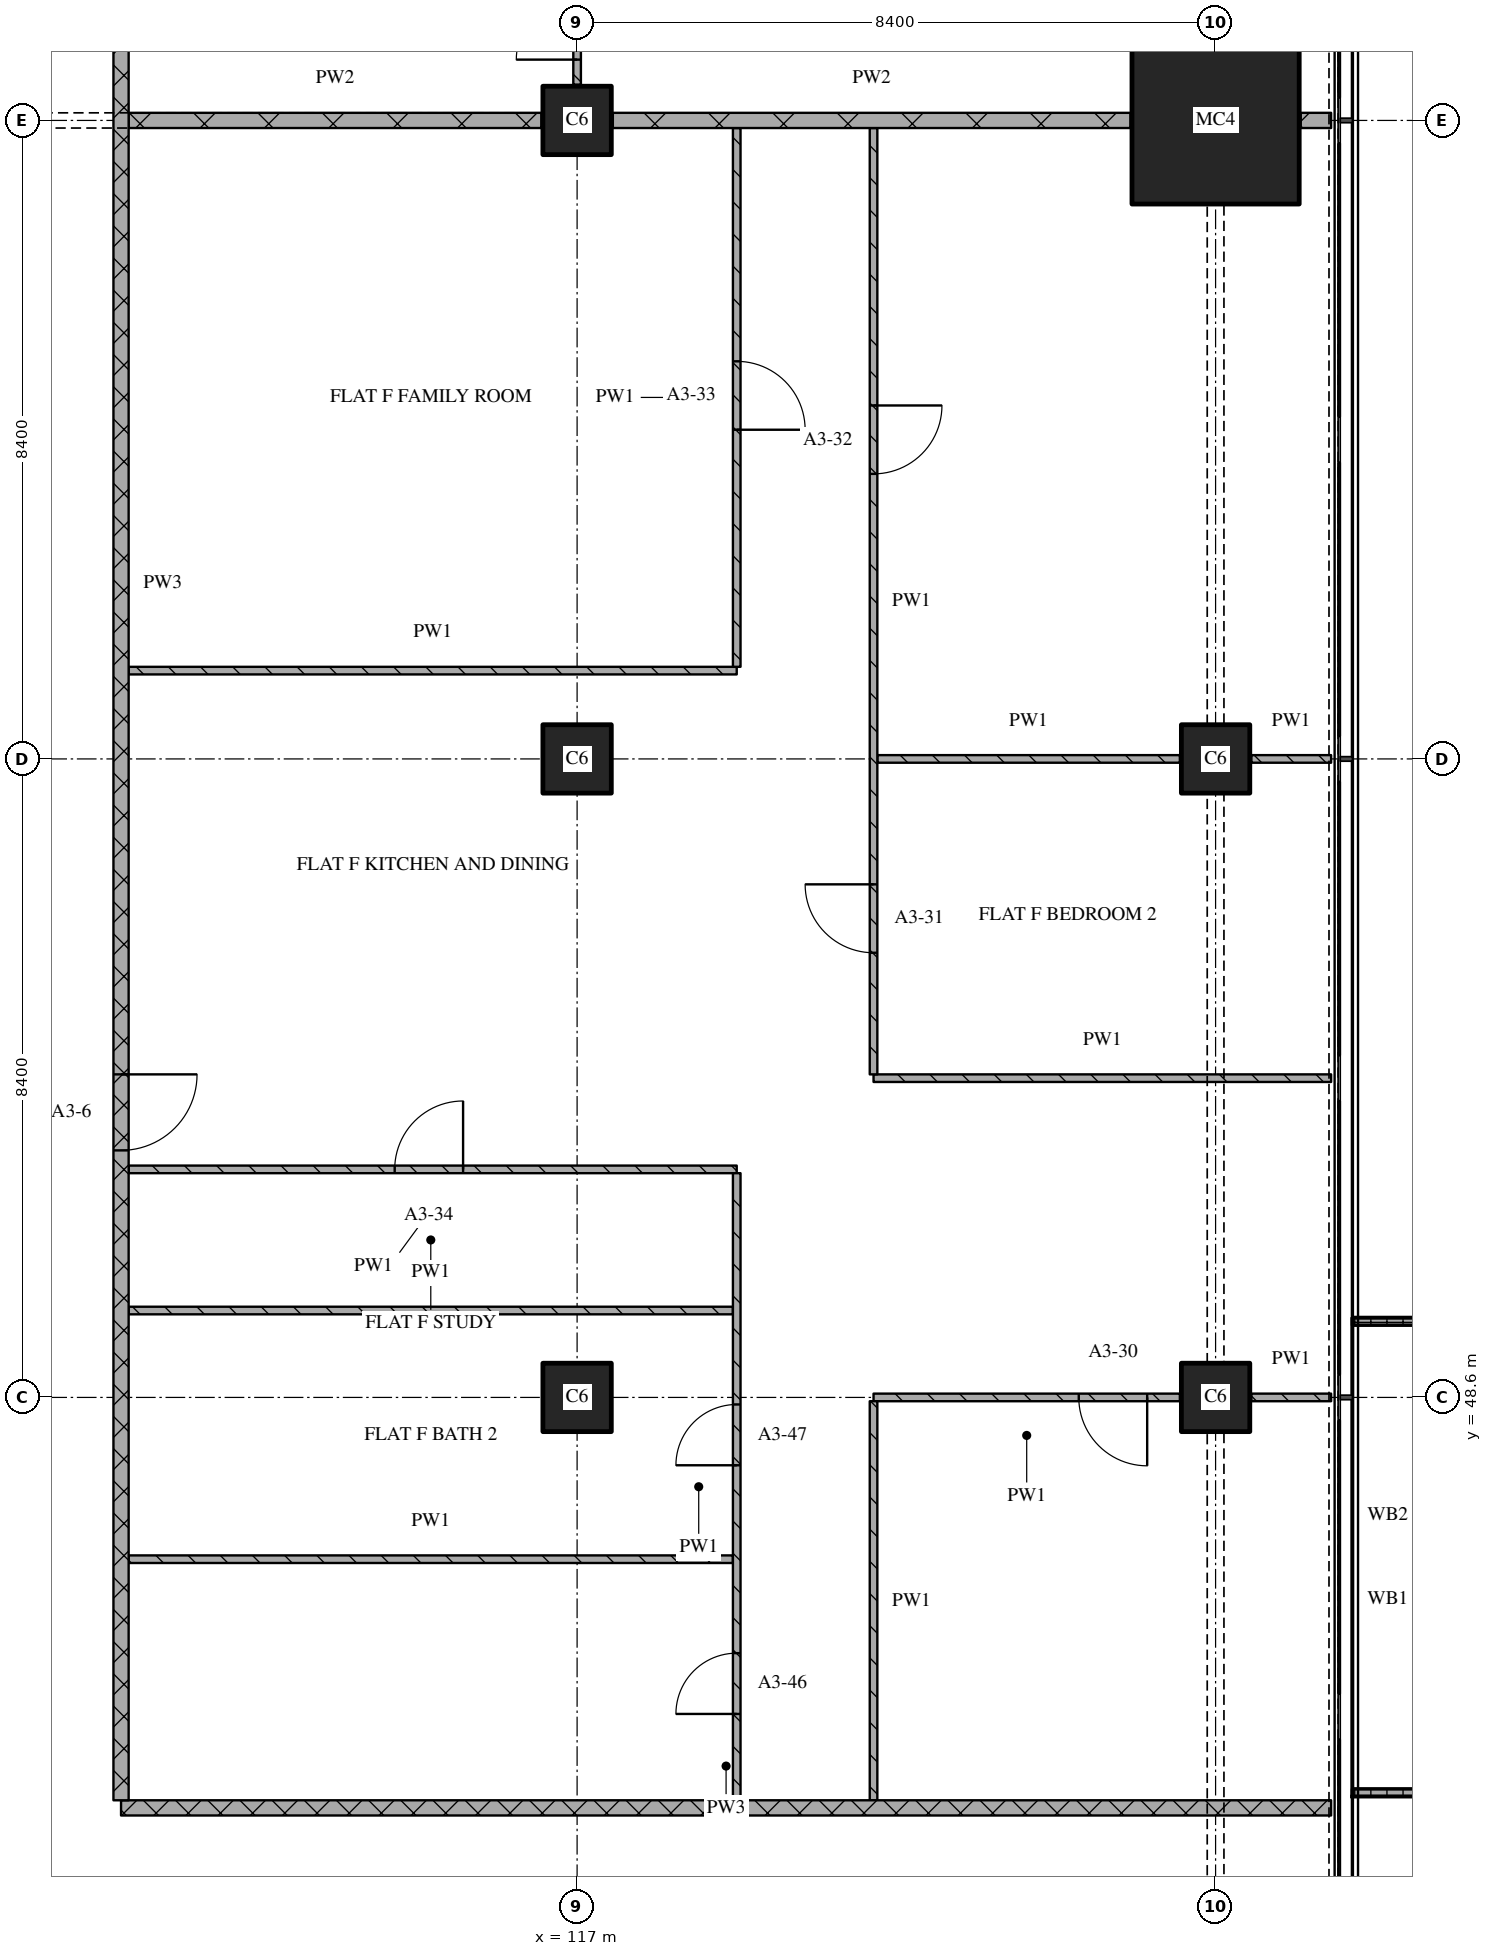
"""IFC4 building model, lengths in metres.
Left out: names, types, materials, properties, quantities, classifications, styles, units other than length and angle.
Written with IfcOpenShell. Run it as: python <this file> out.ifc"""

import sys

from ifc_helpers import new_model, si_unit, direction, frame, frame_2d, origin, origin_2d, place, context, subcontext, project, spatial, polyline, rectangle, outline, extrude, element, fill, save


model = new_model("IFC4")
c1 = context("Model", 3, precision=1e-05, world=origin(), true_north=direction((0.0, 1.0)))
c2 = subcontext(c1, "Body", "Model", "MODEL_VIEW")
j1 = project(units=[si_unit("LENGTHUNIT", "METRE"), si_unit("PLANEANGLEUNIT", "RADIAN")], contexts=[c1])
p1 = place(None, origin())
s1 = spatial("IfcSite", under=j1, at=p1, CompositionType="ELEMENT")
p2 = place(p1, origin())
s2 = spatial("IfcBuilding", under=s1, at=p2, CompositionType="ELEMENT")
p3 = place(p2, frame((0.0, 0.0, 58.8)))
s3 = spatial("IfcBuildingStorey", under=s2, at=p3, CompositionType="ELEMENT", Elevation=58.8)
for number, where, z_axis, x_axis in (
    (1, (117.0, 48.6, 0.0), (0.0, 0.0, 1.0), (1.0, 0.0, 0.0)),
    (2, (117.0, 57.0, 0.0), (0.0, 0.0, 1.0), (1.0, 0.0, 0.0)),
    (3, (117.0, 65.4, 0.0), (0.0, 0.0, 1.0), (1.0, 0.0, 0.0)),
    (4, (125.4, 48.6, 0.0), (0.0, 0.0, 1.0), (1.0, 0.0, 0.0)),
    (5, (125.4, 57.0, 0.0), (0.0, 0.0, 1.0), (1.0, 0.0, 0.0)),
):
    element("IfcColumn", number, at=place(p3, frame(where, z_axis=z_axis, x_axis=x_axis)), inside=s3, PredefinedType="COLUMN", context=c2, shape_type="SweptSolid", body=[
        extrude(rectangle(XDim=0.9, YDim=0.9, at=origin_2d()), origin(), (0.0, 0.0, 1.0), 3.6),
    ])
p4 = place(p3, frame((125.4, 65.4, 0.0), z_axis=(0.0, 0.0, 1.0), x_axis=(1.0, 0.0, 0.0)))
e6 = element("IfcColumn", 6, at=p4, inside=s3, PredefinedType="COLUMN", context=c2, shape_type="SweptSolid", body=[
    extrude(rectangle(XDim=2.2, YDim=2.2, at=origin_2d()), origin(), (0.0, 0.0, 1.0), 3.6),
])
p5 = place(p3, origin())
e7 = element("IfcWall", 7, at=p5, inside=s3, PredefinedType="SOLIDWALL", context=c2, shape_type="SweptSolid", body=[
    extrude(outline(polyline([(127.2, 43.35), (127.2, 43.45), (128.967, 43.45), (128.967, 49.55), (127.2, 49.55), (127.2, 49.65), (129.067, 49.65), (129.067, 43.35), (127.2, 43.35)])), origin(), (0.0, 0.0, 1.0), 1.0),
])
p6 = place(p3, frame((111.0, 43.2, 0.0), z_axis=(0.0, 0.0, 1.0), x_axis=(1.0, 0.0, 0.0)))
e8 = element("IfcWall", 8, at=p6, inside=s3, PredefinedType="PARTITIONING", context=c2, shape_type="SweptSolid", body=[
    extrude(rectangle(XDim=15.92, YDim=0.2, at=frame_2d((7.96, 0.0))), origin(), (0.0, 0.0, 1.0), 3.32),
])
p7 = place(p3, frame((111.1, 46.472, 0.0), z_axis=(0.0, 0.0, 1.0), x_axis=(1.0, 0.0, 0.0)))
e9 = element("IfcWall", 9, at=p7, inside=s3, PredefinedType="PARTITIONING", context=c2, shape_type="SweptSolid", body=[
    extrude(rectangle(XDim=7.95, YDim=0.1, at=frame_2d((3.975, 0.0))), origin(), (0.0, 0.0, 1.0), 3.32),
])
p8 = place(p3, frame((124.93, 48.6, 0.0), z_axis=(0.0, 0.0, 1.0), x_axis=(-1.0, 0.0, 0.0)))
e10 = element("IfcWall", 10, at=p8, inside=s3, PredefinedType="PARTITIONING", context=c2, shape_type="SweptSolid", body=[
    extrude(rectangle(XDim=4.03, YDim=0.1, at=frame_2d((2.015, 0.0))), origin(), (0.0, 0.0, 1.0), 3.32),
])
p9 = place(p8, frame((0.43, 0.0, 0.0)))
e11 = element("IfcOpeningElement", 11, at=p9, cuts=e10, PredefinedType="OPENING", context=c2, shape_type="SweptSolid", body=[
    extrude(rectangle(XDim=0.9, YDim=2.1, at=frame_2d((0.45, 1.05))), frame((0.0, 0.06, 0.0), z_axis=(0.0, -1.0, 0.0), x_axis=(1.0, 0.0, 0.0)), (0.0, 0.0, 1.0), 0.12),
])
p10 = place(p3, frame((125.87, 48.6, 0.0), z_axis=(0.0, 0.0, 1.0), x_axis=(1.0, 0.0, 0.0)))
e12 = element("IfcWall", 12, at=p10, inside=s3, PredefinedType="PARTITIONING", context=c2, shape_type="SweptSolid", body=[
    extrude(rectangle(XDim=1.05, YDim=0.1, at=frame_2d((0.525, 0.0))), origin(), (0.0, 0.0, 1.0), 3.32),
])
p11 = place(p3, frame((111.1, 49.743, 0.0), z_axis=(0.0, 0.0, 1.0), x_axis=(1.0, 0.0, 0.0)))
e13 = element("IfcWall", 13, at=p11, inside=s3, PredefinedType="PARTITIONING", context=c2, shape_type="SweptSolid", body=[
    extrude(rectangle(XDim=7.95, YDim=0.1, at=frame_2d((3.975, 0.0))), origin(), (0.0, 0.0, 1.0), 3.32),
])
p12 = place(p3, frame((119.1, 51.6, 0.0), z_axis=(0.0, 0.0, 1.0), x_axis=(-1.0, 0.0, 0.0)))
e14 = element("IfcWall", 14, at=p12, inside=s3, PredefinedType="PARTITIONING", context=c2, shape_type="SweptSolid", body=[
    extrude(rectangle(XDim=8.0, YDim=0.1, at=frame_2d((4.0, 0.0))), origin(), (0.0, 0.0, 1.0), 3.32),
])
p13 = place(p12, frame((3.6, 0.0, 0.0)))
e15 = element("IfcOpeningElement", 15, at=p13, cuts=e14, PredefinedType="OPENING", context=c2, shape_type="SweptSolid", body=[
    extrude(rectangle(XDim=0.9, YDim=2.1, at=frame_2d((0.45, 1.05))), frame((0.0, 0.06, 0.0), z_axis=(0.0, -1.0, 0.0), x_axis=(1.0, 0.0, 0.0)), (0.0, 0.0, 1.0), 0.12),
])
p14 = place(p3, frame((120.9, 52.8, 0.0), z_axis=(0.0, 0.0, 1.0), x_axis=(1.0, 0.0, 0.0)))
e16 = element("IfcWall", 16, at=p14, inside=s3, PredefinedType="PARTITIONING", context=c2, shape_type="SweptSolid", body=[
    extrude(rectangle(XDim=6.02, YDim=0.1, at=frame_2d((3.01, 0.0))), origin(), (0.0, 0.0, 1.0), 3.32),
])
p15 = place(p3, frame((120.95, 57.0, 0.0), z_axis=(0.0, 0.0, 1.0), x_axis=(1.0, 0.0, 0.0)))
e17 = element("IfcWall", 17, at=p15, inside=s3, PredefinedType="PARTITIONING", context=c2, shape_type="SweptSolid", body=[
    extrude(rectangle(XDim=3.98, YDim=0.1, at=frame_2d((1.99, 0.0))), origin(), (0.0, 0.0, 1.0), 3.32),
])
p16 = place(p3, frame((125.87, 57.0, 0.0), z_axis=(0.0, 0.0, 1.0), x_axis=(1.0, 0.0, 0.0)))
e18 = element("IfcWall", 18, at=p16, inside=s3, PredefinedType="PARTITIONING", context=c2, shape_type="SweptSolid", body=[
    extrude(rectangle(XDim=1.05, YDim=0.1, at=frame_2d((0.525, 0.0))), origin(), (0.0, 0.0, 1.0), 3.32),
])
p17 = place(p3, frame((111.1, 58.162, 0.0), z_axis=(0.0, 0.0, 1.0), x_axis=(1.0, 0.0, 0.0)))
e19 = element("IfcWall", 19, at=p17, inside=s3, PredefinedType="PARTITIONING", context=c2, shape_type="SweptSolid", body=[
    extrude(rectangle(XDim=8.0, YDim=0.1, at=frame_2d((4.0, 0.0))), origin(), (0.0, 0.0, 1.0), 3.32),
])
p18 = place(p3, frame((111.1, 65.4, 0.0), z_axis=(0.0, 0.0, 1.0), x_axis=(1.0, 0.0, 0.0)))
e20 = element("IfcWall", 20, at=p18, inside=s3, PredefinedType="PARTITIONING", context=c2, shape_type="SweptSolid", body=[
    extrude(rectangle(XDim=5.43, YDim=0.2, at=frame_2d((2.715, 0.0))), origin(), (0.0, 0.0, 1.0), 2.82),
])
p19 = place(p3, frame((117.47, 65.4, 0.0), z_axis=(0.0, 0.0, 1.0), x_axis=(1.0, 0.0, 0.0)))
e21 = element("IfcWall", 21, at=p19, inside=s3, PredefinedType="PARTITIONING", context=c2, shape_type="SweptSolid", body=[
    extrude(rectangle(XDim=6.81, YDim=0.2, at=frame_2d((3.405, 0.0))), origin(), (0.0, 0.0, 1.0), 3.32),
])
p20 = place(p3, frame((126.52, 65.4, 0.0), z_axis=(0.0, 0.0, 1.0), x_axis=(1.0, 0.0, 0.0)))
e22 = element("IfcWall", 22, at=p20, inside=s3, PredefinedType="PARTITIONING", context=c2, shape_type="SweptSolid", body=[
    extrude(rectangle(XDim=0.4, YDim=0.2, at=frame_2d((0.2, 0.0))), origin(), (0.0, 0.0, 1.0), 3.32),
])
p21 = place(p3, frame((111.0, 75.32, 0.0), z_axis=(0.0, 0.0, 1.0), x_axis=(0.0, -1.0, 0.0)))
e23 = element("IfcWall", 23, at=p21, inside=s3, PredefinedType="PARTITIONING", context=c2, shape_type="SweptSolid", body=[
    extrude(rectangle(XDim=32.02, YDim=0.2, at=frame_2d((16.01, 0.0))), origin(), (0.0, 0.0, 1.0), 3.32),
])
p22 = place(p21, frame((6.27, 0.0, 0.0)))
e24 = element("IfcOpeningElement", 24, at=p22, cuts=e23, PredefinedType="OPENING", context=c2, shape_type="SweptSolid", body=[
    extrude(rectangle(XDim=1.0, YDim=2.1, at=frame_2d((0.5, 1.05))), frame((0.0, 0.11, 0.0), z_axis=(0.0, -1.0, 0.0), x_axis=(1.0, 0.0, 0.0)), (0.0, 0.0, 1.0), 0.22),
])
p23 = place(p21, frame((22.47, 0.0, 0.0)))
e25 = element("IfcOpeningElement", 25, at=p23, cuts=e23, PredefinedType="OPENING", context=c2, shape_type="SweptSolid", body=[
    extrude(rectangle(XDim=1.0, YDim=2.1, at=frame_2d((0.5, 1.05))), frame((0.0, 0.11, 0.0), z_axis=(0.0, -1.0, 0.0), x_axis=(1.0, 0.0, 0.0)), (0.0, 0.0, 1.0), 0.22),
])
p24 = place(p3, frame((117.0, 65.87, 0.0), z_axis=(0.0, 0.0, 1.0), x_axis=(0.0, 1.0, 0.0)))
e26 = element("IfcWall", 26, at=p24, inside=s3, PredefinedType="PARTITIONING", context=c2, shape_type="SweptSolid", body=[
    extrude(rectangle(XDim=1.88, YDim=0.1, at=frame_2d((0.94, 0.0))), origin(), (0.0, 0.0, 1.0), 3.32),
])
p25 = place(p24, frame((0.33, 0.0, 0.0)))
e27 = element("IfcOpeningElement", 27, at=p25, cuts=e26, PredefinedType="OPENING", context=c2, shape_type="SweptSolid", body=[
    extrude(rectangle(XDim=0.8, YDim=2.1, at=frame_2d((0.4, 1.05))), frame((0.0, 0.06, 0.0), z_axis=(0.0, -1.0, 0.0), x_axis=(1.0, 0.0, 0.0)), (0.0, 0.0, 1.0), 0.12),
])
p26 = place(p3, frame((119.1, 43.3, 0.0), z_axis=(0.0, 0.0, 1.0), x_axis=(0.0, 1.0, 0.0)))
e28 = element("IfcWall", 28, at=p26, inside=s3, PredefinedType="PARTITIONING", context=c2, shape_type="SweptSolid", body=[
    extrude(rectangle(XDim=8.25, YDim=0.1, at=frame_2d((4.125, 0.0))), origin(), (0.0, 0.0, 1.0), 3.32),
])
p27 = place(p26, frame((1.136, 0.0, 0.0)))
e29 = element("IfcOpeningElement", 29, at=p27, cuts=e28, PredefinedType="OPENING", context=c2, shape_type="SweptSolid", body=[
    extrude(rectangle(XDim=0.8, YDim=2.1, at=frame_2d((0.4, 1.05))), frame((0.0, 0.06, 0.0), z_axis=(0.0, -1.0, 0.0), x_axis=(1.0, 0.0, 0.0)), (0.0, 0.0, 1.0), 0.12),
])
p28 = place(p26, frame((4.407, 0.0, 0.0)))
e30 = element("IfcOpeningElement", 30, at=p28, cuts=e28, PredefinedType="OPENING", context=c2, shape_type="SweptSolid", body=[
    extrude(rectangle(XDim=0.8, YDim=2.1, at=frame_2d((0.4, 1.05))), frame((0.0, 0.06, 0.0), z_axis=(0.0, -1.0, 0.0), x_axis=(1.0, 0.0, 0.0)), (0.0, 0.0, 1.0), 0.12),
])
p29 = place(p3, frame((119.1, 58.212, 0.0), z_axis=(0.0, 0.0, 1.0), x_axis=(0.0, 1.0, 0.0)))
e31 = element("IfcWall", 31, at=p29, inside=s3, PredefinedType="PARTITIONING", context=c2, shape_type="SweptSolid", body=[
    extrude(rectangle(XDim=7.088, YDim=0.1, at=frame_2d((3.544, 0.0))), origin(), (0.0, 0.0, 1.0), 3.32),
])
p30 = place(p29, frame((3.119, 0.0, 0.0)))
e32 = element("IfcOpeningElement", 32, at=p30, cuts=e31, PredefinedType="OPENING", context=c2, shape_type="SweptSolid", body=[
    extrude(rectangle(XDim=0.9, YDim=2.1, at=frame_2d((0.45, 1.05))), frame((0.0, 0.06, 0.0), z_axis=(0.0, -1.0, 0.0), x_axis=(1.0, 0.0, 0.0)), (0.0, 0.0, 1.0), 0.12),
])
p31 = place(p3, frame((120.9, 48.55, 0.0), z_axis=(0.0, 0.0, 1.0), x_axis=(0.0, -1.0, 0.0)))
e33 = element("IfcWall", 33, at=p31, inside=s3, PredefinedType="PARTITIONING", context=c2, shape_type="SweptSolid", body=[
    extrude(rectangle(XDim=5.25, YDim=0.1, at=frame_2d((2.625, 0.0))), origin(), (0.0, 0.0, 1.0), 3.32),
])
p32 = place(p3, frame((120.9, 65.3, 0.0), z_axis=(0.0, 0.0, 1.0), x_axis=(0.0, -1.0, 0.0)))
e34 = element("IfcWall", 34, at=p32, inside=s3, PredefinedType="PARTITIONING", context=c2, shape_type="SweptSolid", body=[
    extrude(rectangle(XDim=12.45, YDim=0.1, at=frame_2d((6.225, 0.0))), origin(), (0.0, 0.0, 1.0), 3.32),
])
p33 = place(p32, frame((3.65, 0.0, 0.0)))
e35 = element("IfcOpeningElement", 35, at=p33, cuts=e34, PredefinedType="OPENING", context=c2, shape_type="SweptSolid", body=[
    extrude(rectangle(XDim=0.9, YDim=2.1, at=frame_2d((0.45, 1.05))), frame((0.0, 0.06, 0.0), z_axis=(0.0, -1.0, 0.0), x_axis=(1.0, 0.0, 0.0)), (0.0, 0.0, 1.0), 0.12),
])
p34 = place(p32, frame((9.95, 0.0, 0.0)))
e36 = element("IfcOpeningElement", 36, at=p34, cuts=e34, PredefinedType="OPENING", context=c2, shape_type="SweptSolid", body=[
    extrude(rectangle(XDim=0.9, YDim=2.1, at=frame_2d((0.45, 1.05))), frame((0.0, 0.06, 0.0), z_axis=(0.0, -1.0, 0.0), x_axis=(1.0, 0.0, 0.0)), (0.0, 0.0, 1.0), 0.12),
])
p35 = place(p9, origin())
e37 = element("IfcDoor", 37, at=p35, inside=s3, OperationType="SINGLE_SWING_LEFT", PredefinedType="DOOR", context=c2, shape_type="SweptSolid", body=[
    extrude(rectangle(XDim=0.9, YDim=2.1, at=frame_2d((0.45, 1.05))), frame((0.0, 0.025, 0.0), z_axis=(0.0, -1.0, 0.0), x_axis=(1.0, 0.0, 0.0)), (0.0, 0.0, 1.0), 0.05),
])
fill(e11, e37)
p36 = place(p13, origin())
e38 = element("IfcDoor", 38, at=p36, inside=s3, OperationType="SINGLE_SWING_RIGHT", PredefinedType="DOOR", context=c2, shape_type="SweptSolid", body=[
    extrude(rectangle(XDim=0.9, YDim=2.1, at=frame_2d((0.45, 1.05))), frame((0.0, 0.025, 0.0), z_axis=(0.0, -1.0, 0.0), x_axis=(1.0, 0.0, 0.0)), (0.0, 0.0, 1.0), 0.05),
])
fill(e15, e38)
p37 = place(p23, origin())
e39 = element("IfcDoor", 39, at=p37, inside=s3, OperationType="SINGLE_SWING_LEFT", PredefinedType="DOOR", context=c2, shape_type="SweptSolid", body=[
    extrude(rectangle(XDim=1.0, YDim=2.1, at=frame_2d((0.5, 1.05))), frame((0.0, 0.025, 0.0), z_axis=(0.0, -1.0, 0.0), x_axis=(1.0, 0.0, 0.0)), (0.0, 0.0, 1.0), 0.05),
])
fill(e25, e39)
p38 = place(p25, origin())
e40 = element("IfcDoor", 40, at=p38, inside=s3, OperationType="SINGLE_SWING_LEFT", PredefinedType="DOOR", context=c2, shape_type="SweptSolid", body=[
    extrude(rectangle(XDim=0.8, YDim=2.1, at=frame_2d((0.4, 1.05))), frame((0.0, 0.025, 0.0), z_axis=(0.0, -1.0, 0.0), x_axis=(1.0, 0.0, 0.0)), (0.0, 0.0, 1.0), 0.05),
])
fill(e27, e40)
p39 = place(p27, origin())
e41 = element("IfcDoor", 41, at=p39, inside=s3, OperationType="SINGLE_SWING_LEFT", PredefinedType="DOOR", context=c2, shape_type="SweptSolid", body=[
    extrude(rectangle(XDim=0.8, YDim=2.1, at=frame_2d((0.4, 1.05))), frame((0.0, 0.025, 0.0), z_axis=(0.0, -1.0, 0.0), x_axis=(1.0, 0.0, 0.0)), (0.0, 0.0, 1.0), 0.05),
])
fill(e29, e41)
p40 = place(p28, origin())
e42 = element("IfcDoor", 42, at=p40, inside=s3, OperationType="SINGLE_SWING_LEFT", PredefinedType="DOOR", context=c2, shape_type="SweptSolid", body=[
    extrude(rectangle(XDim=0.8, YDim=2.1, at=frame_2d((0.4, 1.05))), frame((0.0, 0.025, 0.0), z_axis=(0.0, -1.0, 0.0), x_axis=(1.0, 0.0, 0.0)), (0.0, 0.0, 1.0), 0.05),
])
fill(e30, e42)
p41 = place(p30, origin())
e43 = element("IfcDoor", 43, at=p41, inside=s3, OperationType="SINGLE_SWING_RIGHT", PredefinedType="DOOR", context=c2, shape_type="SweptSolid", body=[
    extrude(rectangle(XDim=0.9, YDim=2.1, at=frame_2d((0.45, 1.05))), frame((0.0, 0.025, 0.0), z_axis=(0.0, -1.0, 0.0), x_axis=(1.0, 0.0, 0.0)), (0.0, 0.0, 1.0), 0.05),
])
fill(e32, e43)
p42 = place(p33, origin())
e44 = element("IfcDoor", 44, at=p42, inside=s3, OperationType="SINGLE_SWING_LEFT", PredefinedType="DOOR", context=c2, shape_type="SweptSolid", body=[
    extrude(rectangle(XDim=0.9, YDim=2.1, at=frame_2d((0.45, 1.05))), frame((0.0, 0.025, 0.0), z_axis=(0.0, -1.0, 0.0), x_axis=(1.0, 0.0, 0.0)), (0.0, 0.0, 1.0), 0.05),
])
fill(e35, e44)
p43 = place(p34, origin())
e45 = element("IfcDoor", 45, at=p43, inside=s3, OperationType="SINGLE_SWING_RIGHT", PredefinedType="DOOR", context=c2, shape_type="SweptSolid", body=[
    extrude(rectangle(XDim=0.9, YDim=2.1, at=frame_2d((0.45, 1.05))), frame((0.0, 0.025, 0.0), z_axis=(0.0, -1.0, 0.0), x_axis=(1.0, 0.0, 0.0)), (0.0, 0.0, 1.0), 0.05),
])
fill(e36, e45)
save(model, sys.argv[1])
